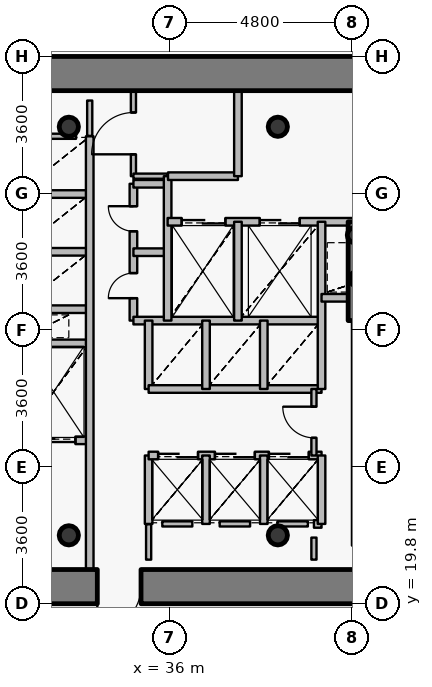
"""IFC4 building model, lengths in metres.
Left out: names, types, materials, properties, quantities, classifications, styles, units other than length and angle.
Written with IfcOpenShell. Run it as: python <this file> out.ifc"""

import sys

from ifc_helpers import new_model, si_unit, direction, frame, frame_2d, origin, origin_2d, place, context, subcontext, project, spatial, rectangle, hollow_circle, extrude, source, transform, mapped, element, fill, save


model = new_model("IFC4")
c1 = context("Model", 3, precision=1e-05, world=origin(), true_north=direction((0.0, 1.0)))
c2 = subcontext(c1, "Body", "Model", "MODEL_VIEW")
j1 = project(units=[si_unit("LENGTHUNIT", "METRE"), si_unit("PLANEANGLEUNIT", "RADIAN")], contexts=[c1])
p1 = place(None, origin())
s1 = spatial("IfcSite", under=j1, at=p1, CompositionType="ELEMENT")
p2 = place(p1, origin())
s2 = spatial("IfcBuilding", under=s1, at=p2, CompositionType="ELEMENT")
p3 = place(p2, frame((0.0, 0.0, 74.4)))
s3 = spatial("IfcBuildingStorey", under=s2, at=p3, CompositionType="ELEMENT", Elevation=74.4)
for number, where, z_axis, x_axis in (
    (1, (33.35, 21.6, 0.0), (0.0, 0.0, 1.0), (1.0, 0.0, 0.0)),
    (2, (38.85, 21.6, 0.0), (0.0, 0.0, 1.0), (1.0, 0.0, 0.0)),
    (3, (38.85, 32.35, 0.0), (0.0, 0.0, 1.0), (1.0, 0.0, 0.0)),
    (4, (33.35, 32.35, 0.0), (0.0, 0.0, 1.0), (1.0, 0.0, 0.0)),
):
    element("IfcColumn", number, at=place(p3, frame(where, z_axis=z_axis, x_axis=x_axis)), inside=s3, PredefinedType="COLUMN", context=c2, shape_type="SweptSolid", body=[
        extrude(hollow_circle(Radius=0.254, WallThickness=0.02, at=origin_2d()), origin(), (0.0, 0.0, 1.0), 4.2),
    ])
for number, where, z_axis, x_axis in (
    (5, (40.95, 28.35, 0.0), (0.0, 0.0, 1.0), (1.0, 0.0, 0.0)),
    (6, (40.88, 29.5, 0.0), (0.0, 0.0, 1.0), (1.0, 0.0, 0.0)),
):
    element("IfcColumn", number, at=place(p3, frame(where, z_axis=z_axis, x_axis=x_axis)), inside=s3, PredefinedType="COLUMN", context=c2, shape_type="SweptSolid", body=[
        extrude(hollow_circle(Radius=0.203, WallThickness=0.016, at=origin_2d()), origin(), (0.0, 0.0, 1.0), 4.2),
    ])
p4 = place(p3, frame((26.75, 33.75, 0.0), z_axis=(0.0, 0.0, 1.0), x_axis=(1.0, 0.0, 0.0)))
e7 = element("IfcWall", 7, at=p4, inside=s3, PredefinedType="SHEAR", context=c2, shape_type="SweptSolid", body=[
    extrude(rectangle(XDim=18.5, YDim=0.9, at=frame_2d((9.25, 0.0))), origin(), (0.0, 0.0, 1.0), 3.4),
])
p5 = place(p3, frame((45.25, 20.25, 0.0), z_axis=(0.0, 0.0, 1.0), x_axis=(-1.0, 0.0, 0.0)))
e8 = element("IfcWall", 8, at=p5, inside=s3, PredefinedType="SHEAR", context=c2, shape_type="SweptSolid", body=[
    extrude(rectangle(XDim=18.5, YDim=0.9, at=frame_2d((9.25, 0.0))), origin(), (0.0, 0.0, 1.0), 3.4),
])
p6 = place(p5, frame((10.0, 0.0, 0.0)))
e9 = element("IfcOpeningElement", 9, at=p6, cuts=e8, PredefinedType="OPENING", context=c2, shape_type="SweptSolid", body=[
    extrude(rectangle(XDim=1.15, YDim=2.15, at=origin_2d()), frame((0.575, 0.46, 1.075), z_axis=(0.0, -1.0, 0.0), x_axis=(1.0, 0.0, 0.0)), (0.0, 0.0, 1.0), 0.92),
])
p7 = place(p3, frame((40.9, 27.25, 0.0), z_axis=(0.0, 0.0, 1.0), x_axis=(0.0, 1.0, 0.0)))
e10 = element("IfcWall", 10, at=p7, inside=s3, PredefinedType="SHEAR", context=c2, shape_type="SweptSolid", body=[
    extrude(rectangle(XDim=2.6, YDim=0.4, at=frame_2d((1.3, 0.0))), origin(), (0.0, 0.0, 1.0), 3.55),
])
p8 = place(p3, frame((32.0, 24.1, 0.0), z_axis=(0.0, 0.0, 1.0), x_axis=(1.0, 0.0, 0.0)))
e11 = element("IfcWall", 11, at=p8, inside=s3, PredefinedType="PARTITIONING", context=c2, shape_type="SweptSolid", body=[
    extrude(rectangle(XDim=1.9, YDim=0.2, at=frame_2d((0.95, 0.0))), origin(), (0.0, 0.0, 1.0), 3.535),
])
p9 = place(p8, frame((0.375, 0.0, 0.0)))
e12 = element("IfcOpeningElement", 12, at=p9, cuts=e11, PredefinedType="OPENING", context=c2, shape_type="SweptSolid", body=[
    extrude(rectangle(XDim=1.15, YDim=2.15, at=origin_2d()), frame((0.575, 0.11, 1.075), z_axis=(0.0, -1.0, 0.0), x_axis=(1.0, 0.0, 0.0)), (0.0, 0.0, 1.0), 0.22),
])
for number, where, z_axis, x_axis in (
    (13, (32.0, 26.65, 0.0), (0.0, 0.0, 1.0), (1.0, 0.0, 0.0)),
    (14, (32.0, 27.55, 0.0), (0.0, 0.0, 1.0), (1.0, 0.0, 0.0)),
    (15, (32.0, 29.06, 0.0), (0.0, 0.0, 1.0), (1.0, 0.0, 0.0)),
    (16, (32.0, 30.58, 0.0), (0.0, 0.0, 1.0), (1.0, 0.0, 0.0)),
):
    element("IfcWall", number, at=place(p3, frame(where, z_axis=z_axis, x_axis=x_axis)), inside=s3, PredefinedType="PARTITIONING", context=c2, shape_type="SweptSolid", body=[
        extrude(rectangle(XDim=1.9, YDim=0.2, at=frame_2d((0.95, 0.0))), origin(), (0.0, 0.0, 1.0), 3.535),
    ])
p10 = place(p3, frame((33.9, 20.7, 0.0), z_axis=(0.0, 0.0, 1.0), x_axis=(0.0, 1.0, 0.0)))
e17 = element("IfcWall", 17, at=p10, inside=s3, PredefinedType="PARTITIONING", context=c2, shape_type="SweptSolid", body=[
    extrude(rectangle(XDim=11.4, YDim=0.2, at=frame_2d((5.7, 0.0))), origin(), (0.0, 0.0, 1.0), 3.535),
])
p11 = place(p3, frame((35.05, 27.25, 0.0), z_axis=(0.0, 0.0, 1.0), x_axis=(0.0, 1.0, 0.0)))
e18 = element("IfcWall", 18, at=p11, inside=s3, PredefinedType="PARTITIONING", context=c2, shape_type="SweptSolid", body=[
    extrude(rectangle(XDim=3.6, YDim=0.2, at=frame_2d((1.8, 0.0))), origin(), (0.0, 0.0, 1.0), 3.95),
])
p12 = place(p11, frame((0.59, 0.0, 0.0)))
e19 = element("IfcOpeningElement", 19, at=p12, cuts=e18, PredefinedType="OPENING", context=c2, shape_type="SweptSolid", body=[
    extrude(rectangle(XDim=0.66, YDim=2.05, at=origin_2d()), frame((0.33, 0.11, 1.025), z_axis=(0.0, -1.0, 0.0), x_axis=(1.0, 0.0, 0.0)), (0.0, 0.0, 1.0), 0.22),
])
p13 = place(p11, frame((2.35, 0.0, 0.0)))
e20 = element("IfcOpeningElement", 20, at=p13, cuts=e18, PredefinedType="OPENING", context=c2, shape_type="SweptSolid", body=[
    extrude(rectangle(XDim=0.66, YDim=2.05, at=origin_2d()), frame((0.33, 0.11, 1.025), z_axis=(0.0, -1.0, 0.0), x_axis=(1.0, 0.0, 0.0)), (0.0, 0.0, 1.0), 0.22),
])
p14 = place(p3, frame((35.05, 27.25, 0.0), z_axis=(0.0, 0.0, 1.0), x_axis=(1.0, 0.0, 0.0)))
e21 = element("IfcWall", 21, at=p14, inside=s3, PredefinedType="PARTITIONING", context=c2, shape_type="SweptSolid", body=[
    extrude(rectangle(XDim=4.95, YDim=0.2, at=frame_2d((2.475, 0.0))), origin(), (0.0, 0.0, 1.0), 3.535),
])
for number, where, z_axis, x_axis in (
    (22, (35.05, 29.05, 0.0), (0.0, 0.0, 1.0), (1.0, 0.0, 0.0)),
    (23, (35.05, 30.85, 0.0), (0.0, 0.0, 1.0), (1.0, 0.0, 0.0)),
):
    element("IfcWall", number, at=place(p3, frame(where, z_axis=z_axis, x_axis=x_axis)), inside=s3, PredefinedType="PARTITIONING", context=c2, shape_type="SweptSolid", body=[
        extrude(rectangle(XDim=0.9, YDim=0.2, at=frame_2d((0.45, 0.0))), origin(), (0.0, 0.0, 1.0), 3.95),
    ])
p15 = place(p3, frame((35.05, 31.05, 0.0), z_axis=(0.0, 0.0, 1.0), x_axis=(0.0, 1.0, 0.0)))
e24 = element("IfcWall", 24, at=p15, inside=s3, PredefinedType="PARTITIONING", context=c2, shape_type="SweptSolid", body=[
    extrude(rectangle(XDim=2.25, YDim=0.135, at=frame_2d((1.125, 0.0))), origin(), (0.0, 0.0, 1.0), 3.535),
])
p16 = place(p15, frame((0.575, 0.0, 0.0)))
e25 = element("IfcOpeningElement", 25, at=p16, cuts=e24, PredefinedType="OPENING", context=c2, shape_type="SweptSolid", body=[
    extrude(rectangle(XDim=1.1, YDim=2.15, at=origin_2d()), frame((0.55, 0.078, 1.075), z_axis=(0.0, -1.0, 0.0), x_axis=(1.0, 0.0, 0.0)), (0.0, 0.0, 1.0), 0.155),
])
p17 = place(p3, frame((35.05, 31.05, 0.0), z_axis=(0.0, 0.0, 1.0), x_axis=(1.0, 0.0, 0.0)))
e26 = element("IfcWall", 26, at=p17, inside=s3, PredefinedType="PARTITIONING", context=c2, shape_type="SweptSolid", body=[
    extrude(rectangle(XDim=0.9, YDim=0.135, at=frame_2d((0.45, 0.0))), origin(), (0.0, 0.0, 1.0), 3.95),
])
p18 = place(p3, frame((35.45, 21.9, 0.0), z_axis=(0.0, 0.0, 1.0), x_axis=(0.0, 1.0, 0.0)))
e27 = element("IfcWall", 27, at=p18, inside=s3, PredefinedType="PARTITIONING", context=c2, shape_type="SweptSolid", body=[
    extrude(rectangle(XDim=1.8, YDim=0.2, at=frame_2d((0.9, 0.0))), origin(), (0.0, 0.0, 1.0), 3.95),
])
p19 = place(p3, frame((35.45, 23.7, 0.0), z_axis=(0.0, 0.0, 1.0), x_axis=(1.0, 0.0, 0.0)))
e28 = element("IfcWall", 28, at=p19, inside=s3, PredefinedType="PARTITIONING", context=c2, shape_type="SweptSolid", body=[
    extrude(rectangle(XDim=4.55, YDim=0.2, at=frame_2d((2.275, 0.0))), origin(), (0.0, 0.0, 1.0), 3.535),
])
p20 = place(p19, frame((0.25, 0.0, 0.0)))
e29 = element("IfcOpeningElement", 29, at=p20, cuts=e28, PredefinedType="OPENING", context=c2, shape_type="SweptSolid", body=[
    extrude(rectangle(XDim=1.05, YDim=2.15, at=origin_2d()), frame((0.525, 0.11, 1.075), z_axis=(0.0, -1.0, 0.0), x_axis=(1.0, 0.0, 0.0)), (0.0, 0.0, 1.0), 0.22),
])
p21 = place(p19, frame((1.745, 0.0, 0.0)))
e30 = element("IfcOpeningElement", 30, at=p21, cuts=e28, PredefinedType="OPENING", context=c2, shape_type="SweptSolid", body=[
    extrude(rectangle(XDim=1.05, YDim=2.15, at=origin_2d()), frame((0.525, 0.11, 1.075), z_axis=(0.0, -1.0, 0.0), x_axis=(1.0, 0.0, 0.0)), (0.0, 0.0, 1.0), 0.22),
])
p22 = place(p19, frame((3.165, 0.0, 0.0)))
e31 = element("IfcOpeningElement", 31, at=p22, cuts=e28, PredefinedType="OPENING", context=c2, shape_type="SweptSolid", body=[
    extrude(rectangle(XDim=1.05, YDim=2.15, at=origin_2d()), frame((0.525, 0.11, 1.075), z_axis=(0.0, -1.0, 0.0), x_axis=(1.0, 0.0, 0.0)), (0.0, 0.0, 1.0), 0.22),
])
p23 = place(p3, frame((35.45, 25.45, 0.0), z_axis=(0.0, 0.0, 1.0), x_axis=(0.0, 1.0, 0.0)))
e32 = element("IfcWall", 32, at=p23, inside=s3, PredefinedType="PARTITIONING", context=c2, shape_type="SweptSolid", body=[
    extrude(rectangle(XDim=1.8, YDim=0.2, at=frame_2d((0.9, 0.0))), origin(), (0.0, 0.0, 1.0), 3.95),
])
p24 = place(p3, frame((35.45, 25.45, 0.0), z_axis=(0.0, 0.0, 1.0), x_axis=(1.0, 0.0, 0.0)))
e33 = element("IfcWall", 33, at=p24, inside=s3, PredefinedType="PARTITIONING", context=c2, shape_type="SweptSolid", body=[
    extrude(rectangle(XDim=4.55, YDim=0.2, at=frame_2d((2.275, 0.0))), origin(), (0.0, 0.0, 1.0), 3.535),
])
p25 = place(p3, frame((35.95, 27.25, 0.0), z_axis=(0.0, 0.0, 1.0), x_axis=(0.0, 1.0, 0.0)))
e34 = element("IfcWall", 34, at=p25, inside=s3, PredefinedType="PARTITIONING", context=c2, shape_type="SweptSolid", body=[
    extrude(rectangle(XDim=3.8, YDim=0.2, at=frame_2d((1.9, 0.0))), origin(), (0.0, 0.0, 1.0), 3.95),
])
p26 = place(p3, frame((35.95, 29.85, 0.0), z_axis=(0.0, 0.0, 1.0), x_axis=(1.0, 0.0, 0.0)))
e35 = element("IfcWall", 35, at=p26, inside=s3, PredefinedType="PARTITIONING", context=c2, shape_type="SweptSolid", body=[
    extrude(rectangle(XDim=8.49, YDim=0.2, at=frame_2d((4.245, 0.0))), origin(), (0.0, 0.0, 1.0), 3.535),
])
p27 = place(p26, frame((6.1, 0.0, 0.0)))
e36 = element("IfcOpeningElement", 36, at=p27, cuts=e35, PredefinedType="OPENING", context=c2, shape_type="SweptSolid", body=[
    extrude(rectangle(XDim=1.2, YDim=2.15, at=origin_2d()), frame((0.6, 0.11, 1.075), z_axis=(0.0, -1.0, 0.0), x_axis=(1.0, 0.0, 0.0)), (0.0, 0.0, 1.0), 0.22),
])
p28 = place(p26, frame((0.37, 0.0, 0.0)))
e37 = element("IfcOpeningElement", 37, at=p28, cuts=e35, PredefinedType="OPENING", context=c2, shape_type="SweptSolid", body=[
    extrude(rectangle(XDim=1.15, YDim=2.15, at=origin_2d()), frame((0.575, 0.11, 1.075), z_axis=(0.0, -1.0, 0.0), x_axis=(1.0, 0.0, 0.0)), (0.0, 0.0, 1.0), 0.22),
])
p29 = place(p26, frame((2.425, 0.0, 0.0)))
e38 = element("IfcOpeningElement", 38, at=p29, cuts=e35, PredefinedType="OPENING", context=c2, shape_type="SweptSolid", body=[
    extrude(rectangle(XDim=1.05, YDim=2.15, at=origin_2d()), frame((0.525, 0.11, 1.075), z_axis=(0.0, -1.0, 0.0), x_axis=(1.0, 0.0, 0.0)), (0.0, 0.0, 1.0), 0.22),
])
p30 = place(p3, frame((35.96, 31.05, 0.0), z_axis=(0.0, 0.0, 1.0), x_axis=(1.0, 0.0, 0.0)))
e39 = element("IfcWall", 39, at=p30, inside=s3, PredefinedType="PARTITIONING", context=c2, shape_type="SweptSolid", body=[
    extrude(rectangle(XDim=1.84, YDim=0.2, at=frame_2d((0.92, 0.0))), origin(), (0.0, 0.0, 1.0), 3.95),
])
for number, where, z_axis, x_axis in (
    (40, (36.96, 21.9, 0.0), (0.0, 0.0, 1.0), (0.0, 1.0, 0.0)),
    (41, (36.96, 25.45, 0.0), (0.0, 0.0, 1.0), (0.0, 1.0, 0.0)),
):
    element("IfcWall", number, at=place(p3, frame(where, z_axis=z_axis, x_axis=x_axis)), inside=s3, PredefinedType="PARTITIONING", context=c2, shape_type="SweptSolid", body=[
        extrude(rectangle(XDim=1.8, YDim=0.2, at=frame_2d((0.9, 0.0))), origin(), (0.0, 0.0, 1.0), 3.95),
    ])
p31 = place(p3, frame((37.8, 27.25, 0.0), z_axis=(0.0, 0.0, 1.0), x_axis=(0.0, 1.0, 0.0)))
e42 = element("IfcWall", 42, at=p31, inside=s3, PredefinedType="PARTITIONING", context=c2, shape_type="SweptSolid", body=[
    extrude(rectangle(XDim=2.6, YDim=0.2, at=frame_2d((1.3, 0.0))), origin(), (0.0, 0.0, 1.0), 3.95),
])
p32 = place(p3, frame((37.8, 31.05, 0.0), z_axis=(0.0, 0.0, 1.0), x_axis=(0.0, 1.0, 0.0)))
e43 = element("IfcWall", 43, at=p32, inside=s3, PredefinedType="PARTITIONING", context=c2, shape_type="SweptSolid", body=[
    extrude(rectangle(XDim=2.25, YDim=0.2, at=frame_2d((1.125, 0.0))), origin(), (0.0, 0.0, 1.0), 3.535),
])
for number, where, z_axis, x_axis in (
    (44, (38.48, 21.9, 0.0), (0.0, 0.0, 1.0), (0.0, 1.0, 0.0)),
    (45, (38.48, 25.45, 0.0), (0.0, 0.0, 1.0), (0.0, 1.0, 0.0)),
):
    element("IfcWall", number, at=place(p3, frame(where, z_axis=z_axis, x_axis=x_axis)), inside=s3, PredefinedType="PARTITIONING", context=c2, shape_type="SweptSolid", body=[
        extrude(rectangle(XDim=1.8, YDim=0.2, at=frame_2d((0.9, 0.0))), origin(), (0.0, 0.0, 1.0), 3.95),
    ])
p33 = place(p3, frame((39.8, 21.9, 0.0), z_axis=(0.0, 0.0, 1.0), x_axis=(1.0, 0.0, 0.0)))
e46 = element("IfcWall", 46, at=p33, inside=s3, PredefinedType="PARTITIONING", context=c2, shape_type="SweptSolid", body=[
    extrude(rectangle(XDim=0.2, YDim=0.2, at=frame_2d((0.1, 0.0))), origin(), (0.0, 0.0, 1.0), 3.95),
])
p34 = place(p3, frame((39.8, 23.7, 0.0), z_axis=(0.0, 0.0, 1.0), x_axis=(0.0, 1.0, 0.0)))
e47 = element("IfcWall", 47, at=p34, inside=s3, PredefinedType="PARTITIONING", context=c2, shape_type="SweptSolid", body=[
    extrude(rectangle(XDim=1.75, YDim=0.135, at=frame_2d((0.875, 0.0))), origin(), (0.0, 0.0, 1.0), 3.95),
])
p35 = place(p34, frame((0.465, 0.0, 0.0)))
e48 = element("IfcOpeningElement", 48, at=p35, cuts=e47, PredefinedType="OPENING", context=c2, shape_type="SweptSolid", body=[
    extrude(rectangle(XDim=0.82, YDim=2.1, at=origin_2d()), frame((0.41, 0.078, 1.05), z_axis=(0.0, -1.0, 0.0), x_axis=(1.0, 0.0, 0.0)), (0.0, 0.0, 1.0), 0.155),
])
p36 = place(p3, frame((40.0, 21.9, 0.0), z_axis=(0.0, 0.0, 1.0), x_axis=(0.0, 1.0, 0.0)))
e49 = element("IfcWall", 49, at=p36, inside=s3, PredefinedType="PARTITIONING", context=c2, shape_type="SweptSolid", body=[
    extrude(rectangle(XDim=1.8, YDim=0.2, at=frame_2d((0.9, 0.0))), origin(), (0.0, 0.0, 1.0), 3.95),
])
p37 = place(p3, frame((40.0, 25.45, 0.0), z_axis=(0.0, 0.0, 1.0), x_axis=(0.0, 1.0, 0.0)))
e50 = element("IfcWall", 50, at=p37, inside=s3, PredefinedType="PARTITIONING", context=c2, shape_type="SweptSolid", body=[
    extrude(rectangle(XDim=4.4, YDim=0.2, at=frame_2d((2.2, 0.0))), origin(), (0.0, 0.0, 1.0), 3.95),
])
p38 = place(p3, frame((40.0, 27.85, 0.0), z_axis=(0.0, 0.0, 1.0), x_axis=(1.0, 0.0, 0.0)))
e51 = element("IfcWall", 51, at=p38, inside=s3, PredefinedType="PARTITIONING", context=c2, shape_type="SweptSolid", body=[
    extrude(rectangle(XDim=0.9, YDim=0.2, at=frame_2d((0.45, 0.0))), origin(), (0.0, 0.0, 1.0), 3.95),
])
p39 = place(p3, frame((40.9, 21.33, 0.0), z_axis=(0.0, 0.0, 1.0), x_axis=(0.0, 1.0, 0.0)))
e52 = element("IfcWall", 52, at=p39, inside=s3, PredefinedType="PARTITIONING", context=c2, shape_type="SweptSolid", body=[
    extrude(rectangle(XDim=5.91, YDim=0.2, at=frame_2d((2.955, 0.0))), origin(), (0.0, 0.0, 1.0), 3.485),
])
p40 = place(p3, frame((36.6, 21.9, 0.0), z_axis=(0.0, 0.0, 1.0), x_axis=(-1.0, 0.0, 0.0)))
e53 = element("IfcWall", 53, at=p40, inside=s3, PredefinedType="PARTITIONING", context=c2, shape_type="SweptSolid", body=[
    extrude(rectangle(XDim=0.79, YDim=0.135, at=frame_2d((0.395, 0.0))), origin(), (0.0, 0.0, 1.0), 3.95),
])
p41 = place(p3, frame((38.12, 21.9, 0.0), z_axis=(0.0, 0.0, 1.0), x_axis=(-1.0, 0.0, 0.0)))
e54 = element("IfcWall", 54, at=p41, inside=s3, PredefinedType="PARTITIONING", context=c2, shape_type="SweptSolid", body=[
    extrude(rectangle(XDim=0.8, YDim=0.135, at=frame_2d((0.4, 0.0))), origin(), (0.0, 0.0, 1.0), 3.95),
])
p42 = place(p3, frame((39.64, 21.9, 0.0), z_axis=(0.0, 0.0, 1.0), x_axis=(-1.0, 0.0, 0.0)))
e55 = element("IfcWall", 55, at=p42, inside=s3, PredefinedType="PARTITIONING", context=c2, shape_type="SweptSolid", body=[
    extrude(rectangle(XDim=0.8, YDim=0.135, at=frame_2d((0.4, 0.0))), origin(), (0.0, 0.0, 1.0), 3.535),
])
p43 = place(p3, frame((32.36, 32.1, 0.0), z_axis=(0.0, 0.0, 1.0), x_axis=(1.0, 0.0, 0.0)))
e56 = element("IfcWall", 56, at=p43, inside=s3, PredefinedType="PARTITIONING", context=c2, shape_type="SweptSolid", body=[
    extrude(rectangle(XDim=1.18, YDim=0.135, at=frame_2d((0.59, 0.0))), origin(), (0.0, 0.0, 1.0), 3.535),
])
p44 = place(p3, frame((39.8, 20.96, 0.0), z_axis=(0.0, 0.0, 1.0), x_axis=(0.0, 1.0, 0.0)))
e57 = element("IfcWall", 57, at=p44, inside=s3, PredefinedType="PARTITIONING", context=c2, shape_type="SweptSolid", body=[
    extrude(rectangle(XDim=0.58, YDim=0.135, at=frame_2d((0.29, 0.0))), origin(), (0.0, 0.0, 1.0), 3.485),
])
for number, where, z_axis, x_axis in (
    (58, (35.45, 21.89, 0.0), (0.0, 0.0, 1.0), (0.0, -1.0, 0.0)),
    (59, (33.9, 32.11, 0.0), (0.0, 0.0, 1.0), (0.0, 1.0, 0.0)),
):
    element("IfcWall", number, at=place(p3, frame(where, z_axis=z_axis, x_axis=x_axis)), inside=s3, PredefinedType="PARTITIONING", context=c2, shape_type="SweptSolid", body=[
        extrude(rectangle(XDim=0.93, YDim=0.135, at=frame_2d((0.465, 0.0))), origin(), (0.0, 0.0, 1.0), 3.535),
    ])
m1 = source(origin(), c2, "Body", "SweptSolid", [
    extrude(rectangle(XDim=1.15, YDim=2.15, at=origin_2d()), frame((0.575, 0.025, 1.075), z_axis=(0.0, -1.0, 0.0), x_axis=(1.0, 0.0, 0.0)), (0.0, 0.0, 1.0), 0.05),
])
p45 = place(p6, origin())
e60 = element("IfcDoor", 60, at=p45, inside=s3, OperationType="SINGLE_SWING_RIGHT", PredefinedType="DOOR", context=c2, shape_type="MappedRepresentation", body=[
    mapped(m1, transform((0.0, 0.0, 0.0), x_axis=(1.0, 0.0, 0.0), y_axis=(0.0, 1.0, 0.0), z_axis=(0.0, 0.0, 1.0), scale=1.0)),
])
fill(e9, e60)
m2 = source(origin(), c2, "Body", "SweptSolid", [
    extrude(rectangle(XDim=1.15, YDim=2.15, at=origin_2d()), frame((0.575, 0.025, 1.075), z_axis=(0.0, -1.0, 0.0), x_axis=(1.0, 0.0, 0.0)), (0.0, 0.0, 1.0), 0.05),
])
p46 = place(p28, origin())
e61 = element("IfcDoor", 61, at=p46, inside=s3, OperationType="DOUBLE_DOOR_SLIDING", PredefinedType="USERDEFINED", context=c2, shape_type="MappedRepresentation", body=[
    mapped(m2, transform((0.0, 0.0, 0.0), x_axis=(1.0, 0.0, 0.0), y_axis=(0.0, 1.0, 0.0), z_axis=(0.0, 0.0, 1.0), scale=1.0)),
])
fill(e37, e61)
p47 = place(p9, origin())
e62 = element("IfcDoor", 62, at=p47, inside=s3, OperationType="DOUBLE_DOOR_SLIDING", PredefinedType="USERDEFINED", context=c2, shape_type="MappedRepresentation", body=[
    mapped(m2, transform((0.0, 0.0, 0.0), x_axis=(1.0, 0.0, 0.0), y_axis=(0.0, 1.0, 0.0), z_axis=(0.0, 0.0, 1.0), scale=1.0)),
])
fill(e12, e62)
m3 = source(origin(), c2, "Body", "SweptSolid", [
    extrude(rectangle(XDim=1.05, YDim=2.15, at=origin_2d()), frame((0.525, 0.025, 1.075), z_axis=(0.0, -1.0, 0.0), x_axis=(1.0, 0.0, 0.0)), (0.0, 0.0, 1.0), 0.05),
])
p48 = place(p29, origin())
e63 = element("IfcDoor", 63, at=p48, inside=s3, OperationType="DOUBLE_DOOR_SLIDING", PredefinedType="USERDEFINED", context=c2, shape_type="MappedRepresentation", body=[
    mapped(m3, transform((0.0, 0.0, 0.0), x_axis=(1.0, 0.0, 0.0), y_axis=(0.0, 1.0, 0.0), z_axis=(0.0, 0.0, 1.0), scale=1.0)),
])
fill(e38, e63)
p49 = place(p20, origin())
e64 = element("IfcDoor", 64, at=p49, inside=s3, OperationType="DOUBLE_DOOR_SLIDING", PredefinedType="USERDEFINED", context=c2, shape_type="MappedRepresentation", body=[
    mapped(m3, transform((0.0, 0.0, 0.0), x_axis=(1.0, 0.0, 0.0), y_axis=(0.0, 1.0, 0.0), z_axis=(0.0, 0.0, 1.0), scale=1.0)),
])
fill(e29, e64)
p50 = place(p21, origin())
e65 = element("IfcDoor", 65, at=p50, inside=s3, OperationType="DOUBLE_DOOR_SLIDING", PredefinedType="USERDEFINED", context=c2, shape_type="MappedRepresentation", body=[
    mapped(m3, transform((0.0, 0.0, 0.0), x_axis=(1.0, 0.0, 0.0), y_axis=(0.0, 1.0, 0.0), z_axis=(0.0, 0.0, 1.0), scale=1.0)),
])
fill(e30, e65)
p51 = place(p22, origin())
e66 = element("IfcDoor", 66, at=p51, inside=s3, OperationType="DOUBLE_DOOR_SLIDING", PredefinedType="USERDEFINED", context=c2, shape_type="MappedRepresentation", body=[
    mapped(m3, transform((0.0, 0.0, 0.0), x_axis=(1.0, 0.0, 0.0), y_axis=(0.0, 1.0, 0.0), z_axis=(0.0, 0.0, 1.0), scale=1.0)),
])
fill(e31, e66)
m4 = source(origin(), c2, "Body", "SweptSolid", [
    extrude(rectangle(XDim=0.66, YDim=2.05, at=origin_2d()), frame((0.33, 0.025, 1.025), z_axis=(0.0, -1.0, 0.0), x_axis=(1.0, 0.0, 0.0)), (0.0, 0.0, 1.0), 0.05),
])
p52 = place(p12, origin())
e67 = element("IfcDoor", 67, at=p52, inside=s3, OperationType="SINGLE_SWING_LEFT", PredefinedType="USERDEFINED", context=c2, shape_type="MappedRepresentation", body=[
    mapped(m4, transform((0.0, 0.0, 0.0), x_axis=(1.0, 0.0, 0.0), y_axis=(0.0, 1.0, 0.0), z_axis=(0.0, 0.0, 1.0), scale=1.0)),
])
fill(e19, e67)
p53 = place(p13, origin())
e68 = element("IfcDoor", 68, at=p53, inside=s3, OperationType="SINGLE_SWING_RIGHT", PredefinedType="USERDEFINED", context=c2, shape_type="MappedRepresentation", body=[
    mapped(m4, transform((0.0, 0.0, 0.0), x_axis=(1.0, 0.0, 0.0), y_axis=(0.0, 1.0, 0.0), z_axis=(0.0, 0.0, 1.0), scale=1.0)),
])
fill(e20, e68)
m5 = source(origin(), c2, "Body", "SweptSolid", [
    extrude(rectangle(XDim=1.1, YDim=2.15, at=origin_2d()), frame((0.55, 0.025, 1.075), z_axis=(0.0, -1.0, 0.0), x_axis=(1.0, 0.0, 0.0)), (0.0, 0.0, 1.0), 0.05),
])
p54 = place(p16, origin())
e69 = element("IfcDoor", 69, at=p54, inside=s3, OperationType="SINGLE_SWING_LEFT", PredefinedType="DOOR", context=c2, shape_type="MappedRepresentation", body=[
    mapped(m5, transform((0.0, 0.0, 0.0), x_axis=(1.0, 0.0, 0.0), y_axis=(0.0, 1.0, 0.0), z_axis=(0.0, 0.0, 1.0), scale=1.0)),
])
fill(e25, e69)
m6 = source(origin(), c2, "Body", "SweptSolid", [
    extrude(rectangle(XDim=0.82, YDim=2.1, at=origin_2d()), frame((0.41, 0.025, 1.05), z_axis=(0.0, -1.0, 0.0), x_axis=(1.0, 0.0, 0.0)), (0.0, 0.0, 1.0), 0.05),
])
p55 = place(p35, origin())
e70 = element("IfcDoor", 70, at=p55, inside=s3, OperationType="SINGLE_SWING_RIGHT", PredefinedType="DOOR", context=c2, shape_type="MappedRepresentation", body=[
    mapped(m6, transform((0.0, 0.0, 0.0), x_axis=(1.0, 0.0, 0.0), y_axis=(0.0, 1.0, 0.0), z_axis=(0.0, 0.0, 1.0), scale=1.0)),
])
fill(e48, e70)
save(model, sys.argv[1])
